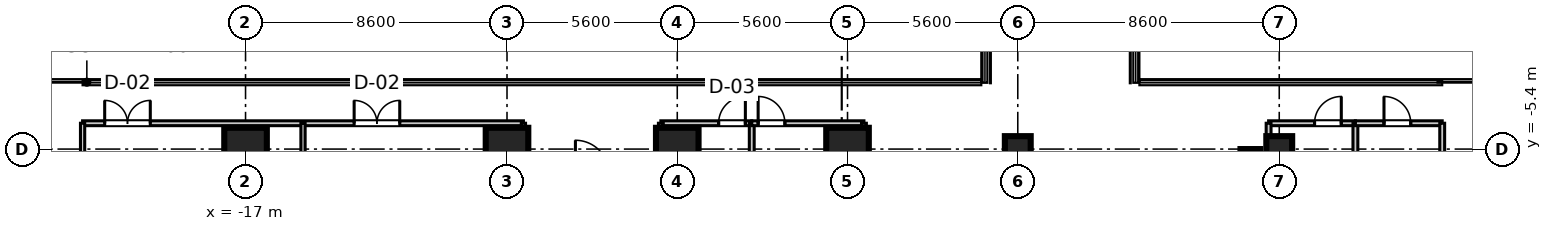
"""IFC4 building model, lengths in metres.
Left out: names, types, materials, properties, quantities, classifications, styles, units other than length and angle.
Written with IfcOpenShell. Run it as: python <this file> out.ifc"""

import sys

from ifc_helpers import new_model, si_unit, direction, frame, frame_2d, origin, origin_2d, place, context, subcontext, project, spatial, rectangle, extrude, source, transform, mapped, element, fill, save


model = new_model("IFC4")
c1 = context("Model", 3, precision=1e-05, world=origin(), true_north=direction((0.0, 1.0)))
c2 = subcontext(c1, "Body", "Model", "MODEL_VIEW")
j1 = project(units=[si_unit("LENGTHUNIT", "METRE"), si_unit("PLANEANGLEUNIT", "RADIAN")], contexts=[c1])
p1 = place(None, origin())
s1 = spatial("IfcSite", under=j1, at=p1, CompositionType="ELEMENT")
p2 = place(p1, origin())
s2 = spatial("IfcBuilding", under=s1, at=p2, CompositionType="ELEMENT")
p3 = place(p2, frame((0.0, 0.0, 54.3)))
s3 = spatial("IfcBuildingStorey", under=s2, at=p3, CompositionType="ELEMENT", Elevation=54.3)
m1 = source(origin(), c2, "Body", "SweptSolid", [
    extrude(rectangle(XDim=1.4, YDim=1.4, at=origin_2d()), origin(), (0.0, 0.0, 1.0), 3.605),
])
for number, where, z_axis, x_axis in (
    (1, (-17.0, -5.4, 0.0), (0.0, 0.0, 1.0), (1.0, 0.0, 0.0)),
    (2, (-8.4, -5.4, 0.0), (0.0, 0.0, 1.0), (1.0, 0.0, 0.0)),
    (3, (-2.8, -5.4, 0.0), (0.0, 0.0, 1.0), (1.0, 0.0, 0.0)),
    (4, (2.8, -5.4, 0.0), (0.0, 0.0, 1.0), (1.0, 0.0, 0.0)),
):
    element("IfcColumn", number, at=place(p3, frame(where, z_axis=z_axis, x_axis=x_axis)), inside=s3, PredefinedType="COLUMN", context=c2, shape_type="MappedRepresentation", body=[
        mapped(m1, transform((0.0, 0.0, 0.0), scale=1.0)),
    ])
m2 = source(origin(), c2, "Body", "SweptSolid", [
    extrude(rectangle(XDim=0.85, YDim=0.85, at=origin_2d()), origin(), (0.0, 0.0, 1.0), 3.605),
])
for number, where, z_axis, x_axis in (
    (5, (8.4, -5.4, 0.0), (0.0, 0.0, 1.0), (1.0, 0.0, 0.0)),
    (6, (17.0, -5.4, 0.0), (0.0, 0.0, 1.0), (1.0, 0.0, 0.0)),
):
    element("IfcColumn", number, at=place(p3, frame(where, z_axis=z_axis, x_axis=x_axis)), inside=s3, PredefinedType="PILASTER", context=c2, shape_type="MappedRepresentation", body=[
        mapped(m2, transform((0.0, 0.0, 0.0), scale=1.0)),
    ])
m3 = source(origin(), c2, "Body", "SweptSolid", [
    extrude(rectangle(XDim=11.6, YDim=0.65, at=frame_2d((5.8, 0.0))), origin(), (0.0, 0.0, 1.0), 3.37),
])
p4 = place(p3, frame((16.05, -17.0, 0.0), z_axis=(0.0, 0.0, 1.0), x_axis=(0.0, 1.0, 0.0)))
e7 = element("IfcWall", 7, at=p4, inside=s3, PredefinedType="SHEAR", context=c2, shape_type="MappedRepresentation", body=[
    mapped(m3, transform((0.0, 0.0, 0.0), scale=1.0)),
])
m4 = source(origin(), c2, "Body", "SweptSolid", [
    extrude(rectangle(XDim=2.855, YDim=0.16, at=frame_2d((1.427, 0.0))), origin(), (0.0, 0.0, 1.0), 2.71),
])
p5 = place(p3, frame((16.65, -4.55, 0.0), z_axis=(0.0, 0.0, 1.0), x_axis=(1.0, 0.0, 0.0)))
e8 = element("IfcWall", 8, at=p5, inside=s3, PredefinedType="PARTITIONING", context=c2, shape_type="MappedRepresentation", body=[
    mapped(m4, transform((0.0, 0.0, 0.0), scale=1.0)),
])
p6 = place(p5, frame((1.511, 0.0, 0.0)))
e9 = element("IfcOpeningElement", 9, at=p6, cuts=e8, PredefinedType="OPENING", context=c2, shape_type="SweptSolid", body=[
    extrude(rectangle(XDim=0.88, YDim=2.1, at=frame_2d((0.44, 1.05))), frame((0.0, 0.09, 0.0), z_axis=(0.0, -1.0, 0.0), x_axis=(1.0, 0.0, 0.0)), (0.0, 0.0, 1.0), 0.18),
])
m5 = source(origin(), c2, "Body", "SweptSolid", [
    extrude(rectangle(XDim=20.55, YDim=0.16, at=frame_2d((10.275, 0.0))), origin(), (0.0, 0.0, 1.0), 2.71),
])
for number, where, z_axis, x_axis in (
    (10, (16.65, -25.1, 0.0), (0.0, 0.0, 1.0), (0.0, 1.0, 0.0)),
    (11, (19.505, -25.1, 0.0), (0.0, 0.0, 1.0), (0.0, 1.0, 0.0)),
):
    element("IfcWall", number, at=place(p3, frame(where, z_axis=z_axis, x_axis=x_axis)), inside=s3, PredefinedType="PARTITIONING", context=c2, shape_type="MappedRepresentation", body=[
        mapped(m5, transform((0.0, 0.0, 0.0), scale=1.0)),
    ])
m6 = source(origin(), c2, "Body", "SweptSolid", [
    extrude(rectangle(XDim=2.855, YDim=0.16, at=frame_2d((1.428, 0.0))), origin(), (0.0, 0.0, 1.0), 2.71),
])
p7 = place(p3, frame((19.505, -4.55, 0.0), z_axis=(0.0, 0.0, 1.0), x_axis=(1.0, 0.0, 0.0)))
e12 = element("IfcWall", 12, at=p7, inside=s3, PredefinedType="PARTITIONING", context=c2, shape_type="MappedRepresentation", body=[
    mapped(m6, transform((0.0, 0.0, 0.0), scale=1.0)),
])
p8 = place(p7, frame((0.94, 0.0, 0.0)))
e13 = element("IfcOpeningElement", 13, at=p8, cuts=e12, PredefinedType="OPENING", context=c2, shape_type="SweptSolid", body=[
    extrude(rectangle(XDim=0.88, YDim=2.1, at=frame_2d((0.44, 1.05))), frame((0.0, 0.09, 0.0), z_axis=(0.0, -1.0, 0.0), x_axis=(1.0, 0.0, 0.0)), (0.0, 0.0, 1.0), 0.18),
])
m7 = source(origin(), c2, "Body", "SweptSolid", [
    extrude(rectangle(XDim=19.13, YDim=0.16, at=frame_2d((9.565, 0.0))), origin(), (0.0, 0.0, 1.0), 2.71),
])
p9 = place(p3, frame((22.36, -23.68, 0.0), z_axis=(0.0, 0.0, 1.0), x_axis=(0.0, 1.0, 0.0)))
e14 = element("IfcWall", 14, at=p9, inside=s3, PredefinedType="PARTITIONING", context=c2, shape_type="MappedRepresentation", body=[
    mapped(m7, transform((0.0, 0.0, 0.0), scale=1.0)),
])
m8 = source(origin(), c2, "Body", "SweptSolid", [
    extrude(rectangle(XDim=14.5, YDim=0.16, at=frame_2d((7.25, 0.0))), origin(), (0.0, 0.0, 1.0), 2.71),
])
p10 = place(p3, frame((-22.36, -4.55, 0.0), z_axis=(0.0, 0.0, 1.0), x_axis=(1.0, 0.0, 0.0)))
e15 = element("IfcWall", 15, at=p10, inside=s3, PredefinedType="PARTITIONING", context=c2, shape_type="MappedRepresentation", body=[
    mapped(m8, transform((0.0, 0.0, 0.0), scale=1.0)),
])
p11 = place(p10, frame((0.727, 0.0, 0.0)))
e16 = element("IfcOpeningElement", 16, at=p11, cuts=e15, PredefinedType="OPENING", context=c2, shape_type="SweptSolid", body=[
    extrude(rectangle(XDim=1.5, YDim=2.15, at=frame_2d((0.75, 1.075))), frame((0.0, 0.09, 0.0), z_axis=(0.0, -1.0, 0.0), x_axis=(1.0, 0.0, 0.0)), (0.0, 0.0, 1.0), 0.18),
])
p12 = place(p10, frame((8.932, 0.0, 0.0)))
e17 = element("IfcOpeningElement", 17, at=p12, cuts=e15, PredefinedType="OPENING", context=c2, shape_type="SweptSolid", body=[
    extrude(rectangle(XDim=1.5, YDim=2.15, at=frame_2d((0.75, 1.075))), frame((0.0, 0.09, 0.0), z_axis=(0.0, -1.0, 0.0), x_axis=(1.0, 0.0, 0.0)), (0.0, 0.0, 1.0), 0.18),
])
m9 = source(origin(), c2, "Body", "SweptSolid", [
    extrude(rectangle(XDim=19.13, YDim=0.14, at=frame_2d((9.565, 0.0))), origin(), (0.0, 0.0, 1.0), 2.71),
])
p13 = place(p3, frame((-22.36, -23.68, 0.0), z_axis=(0.0, 0.0, 1.0), x_axis=(0.0, 1.0, 0.0)))
e18 = element("IfcWall", 18, at=p13, inside=s3, PredefinedType="PARTITIONING", context=c2, shape_type="MappedRepresentation", body=[
    mapped(m9, transform((0.0, 0.0, 0.0), scale=1.0)),
])
m10 = source(origin(), c2, "Body", "SweptSolid", [
    extrude(rectangle(XDim=20.55, YDim=0.14, at=frame_2d((10.275, 0.0))), origin(), (0.0, 0.0, 1.0), 2.71),
])
for number, where, z_axis, x_axis in (
    (19, (-7.86, -25.1, 0.0), (0.0, 0.0, 1.0), (0.0, 1.0, 0.0)),
    (20, (-15.11, -25.1, 0.0), (0.0, 0.0, 1.0), (0.0, 1.0, 0.0)),
):
    element("IfcWall", number, at=place(p3, frame(where, z_axis=z_axis, x_axis=x_axis)), inside=s3, PredefinedType="PARTITIONING", context=c2, shape_type="MappedRepresentation", body=[
        mapped(m10, transform((0.0, 0.0, 0.0), scale=1.0)),
    ])
m11 = source(origin(), c2, "Body", "SweptSolid", [
    extrude(rectangle(XDim=2.99, YDim=0.16, at=frame_2d((1.495, 0.0))), origin(), (0.0, 0.0, 1.0), 2.71),
])
p14 = place(p3, frame((-3.34, -4.55, 0.0), z_axis=(0.0, 0.0, 1.0), x_axis=(1.0, 0.0, 0.0)))
e21 = element("IfcWall", 21, at=p14, inside=s3, PredefinedType="PARTITIONING", context=c2, shape_type="MappedRepresentation", body=[
    mapped(m11, transform((0.0, 0.0, 0.0), scale=1.0)),
])
p15 = place(p14, frame((1.9, 0.0, 0.0)))
e22 = element("IfcOpeningElement", 22, at=p15, cuts=e21, PredefinedType="OPENING", context=c2, shape_type="SweptSolid", body=[
    extrude(rectangle(XDim=0.88, YDim=2.1, at=frame_2d((0.44, 1.05))), frame((0.0, 0.09, 0.0), z_axis=(0.0, -1.0, 0.0), x_axis=(1.0, 0.0, 0.0)), (0.0, 0.0, 1.0), 0.18),
])
for number, where, z_axis, x_axis in (
    (23, (-3.34, -25.1, 0.0), (0.0, 0.0, 1.0), (0.0, 1.0, 0.0)),
    (24, (-0.35, -25.1, 0.0), (0.0, 0.0, 1.0), (0.0, 1.0, 0.0)),
):
    element("IfcWall", number, at=place(p3, frame(where, z_axis=z_axis, x_axis=x_axis)), inside=s3, PredefinedType="PARTITIONING", context=c2, shape_type="MappedRepresentation", body=[
        mapped(m5, transform((0.0, 0.0, 0.0), scale=1.0)),
    ])
m12 = source(origin(), c2, "Body", "SweptSolid", [
    extrude(rectangle(XDim=3.69, YDim=0.16, at=frame_2d((1.845, 0.0))), origin(), (0.0, 0.0, 1.0), 2.71),
])
p16 = place(p3, frame((-0.35, -4.55, 0.0), z_axis=(0.0, 0.0, 1.0), x_axis=(1.0, 0.0, 0.0)))
e25 = element("IfcWall", 25, at=p16, inside=s3, PredefinedType="PARTITIONING", context=c2, shape_type="MappedRepresentation", body=[
    mapped(m12, transform((0.0, 0.0, 0.0), scale=1.0)),
])
p17 = place(p16, frame((0.21, 0.0, 0.0)))
e26 = element("IfcOpeningElement", 26, at=p17, cuts=e25, PredefinedType="OPENING", context=c2, shape_type="SweptSolid", body=[
    extrude(rectangle(XDim=0.88, YDim=2.1, at=frame_2d((0.44, 1.05))), frame((0.0, 0.09, 0.0), z_axis=(0.0, -1.0, 0.0), x_axis=(1.0, 0.0, 0.0)), (0.0, 0.0, 1.0), 0.18),
])
p18 = place(p3, frame((3.34, -25.1, 0.0), z_axis=(0.0, 0.0, 1.0), x_axis=(0.0, 1.0, 0.0)))
e27 = element("IfcWall", 27, at=p18, inside=s3, PredefinedType="PARTITIONING", context=c2, shape_type="MappedRepresentation", body=[
    mapped(m5, transform((0.0, 0.0, 0.0), scale=1.0)),
])
m13 = source(origin(), c2, "Body", "SweptSolid", [
    extrude(rectangle(XDim=0.88, YDim=2.1, at=frame_2d((0.44, 1.05))), frame((0.0, 0.025, 0.0), z_axis=(0.0, -1.0, 0.0), x_axis=(1.0, 0.0, 0.0)), (0.0, 0.0, 1.0), 0.05),
])
p19 = place(p6, frame((0.88, 0.0, 0.0), z_axis=(0.0, 0.0, 1.0), x_axis=(-1.0, 0.0, 0.0)))
e28 = element("IfcDoor", 28, at=p19, inside=s3, OperationType="SINGLE_SWING_RIGHT", PredefinedType="DOOR", context=c2, shape_type="MappedRepresentation", body=[
    mapped(m13, transform((0.0, 0.0, 0.0), scale=1.0)),
])
fill(e9, e28)
p20 = place(p8, frame((0.88, 0.0, 0.0), z_axis=(0.0, 0.0, 1.0), x_axis=(-1.0, 0.0, 0.0)))
e29 = element("IfcDoor", 29, at=p20, inside=s3, OperationType="SINGLE_SWING_LEFT", PredefinedType="DOOR", context=c2, shape_type="MappedRepresentation", body=[
    mapped(m13, transform((0.0, 0.0, 0.0), scale=1.0)),
])
fill(e13, e29)
m14 = source(origin(), c2, "Body", "SweptSolid", [
    extrude(rectangle(XDim=1.5, YDim=2.15, at=frame_2d((0.75, 1.075))), frame((0.0, 0.025, 0.0), z_axis=(0.0, -1.0, 0.0), x_axis=(1.0, 0.0, 0.0)), (0.0, 0.0, 1.0), 0.05),
])
p21 = place(p11, frame((1.5, 0.0, 0.0), z_axis=(0.0, 0.0, 1.0), x_axis=(-1.0, 0.0, 0.0)))
e30 = element("IfcDoor", 30, at=p21, inside=s3, OperationType="DOUBLE_DOOR_SINGLE_SWING", PredefinedType="DOOR", context=c2, shape_type="MappedRepresentation", body=[
    mapped(m14, transform((0.0, 0.0, 0.0), scale=1.0)),
])
fill(e16, e30)
p22 = place(p12, frame((1.5, 0.0, 0.0), z_axis=(0.0, 0.0, 1.0), x_axis=(-1.0, 0.0, 0.0)))
e31 = element("IfcDoor", 31, at=p22, inside=s3, OperationType="DOUBLE_DOOR_SINGLE_SWING", PredefinedType="DOOR", context=c2, shape_type="MappedRepresentation", body=[
    mapped(m14, transform((0.0, 0.0, 0.0), scale=1.0)),
])
fill(e17, e31)
p23 = place(p15, frame((0.88, 0.0, 0.0), z_axis=(0.0, 0.0, 1.0), x_axis=(-1.0, 0.0, 0.0)))
e32 = element("IfcDoor", 32, at=p23, inside=s3, OperationType="SINGLE_SWING_RIGHT", PredefinedType="DOOR", context=c2, shape_type="MappedRepresentation", body=[
    mapped(m13, transform((0.0, 0.0, 0.0), scale=1.0)),
])
fill(e22, e32)
p24 = place(p17, frame((0.88, 0.0, 0.0), z_axis=(0.0, 0.0, 1.0), x_axis=(-1.0, 0.0, 0.0)))
e33 = element("IfcDoor", 33, at=p24, inside=s3, OperationType="SINGLE_SWING_LEFT", PredefinedType="DOOR", context=c2, shape_type="MappedRepresentation", body=[
    mapped(m13, transform((0.0, 0.0, 0.0), scale=1.0)),
])
fill(e26, e33)
save(model, sys.argv[1])
